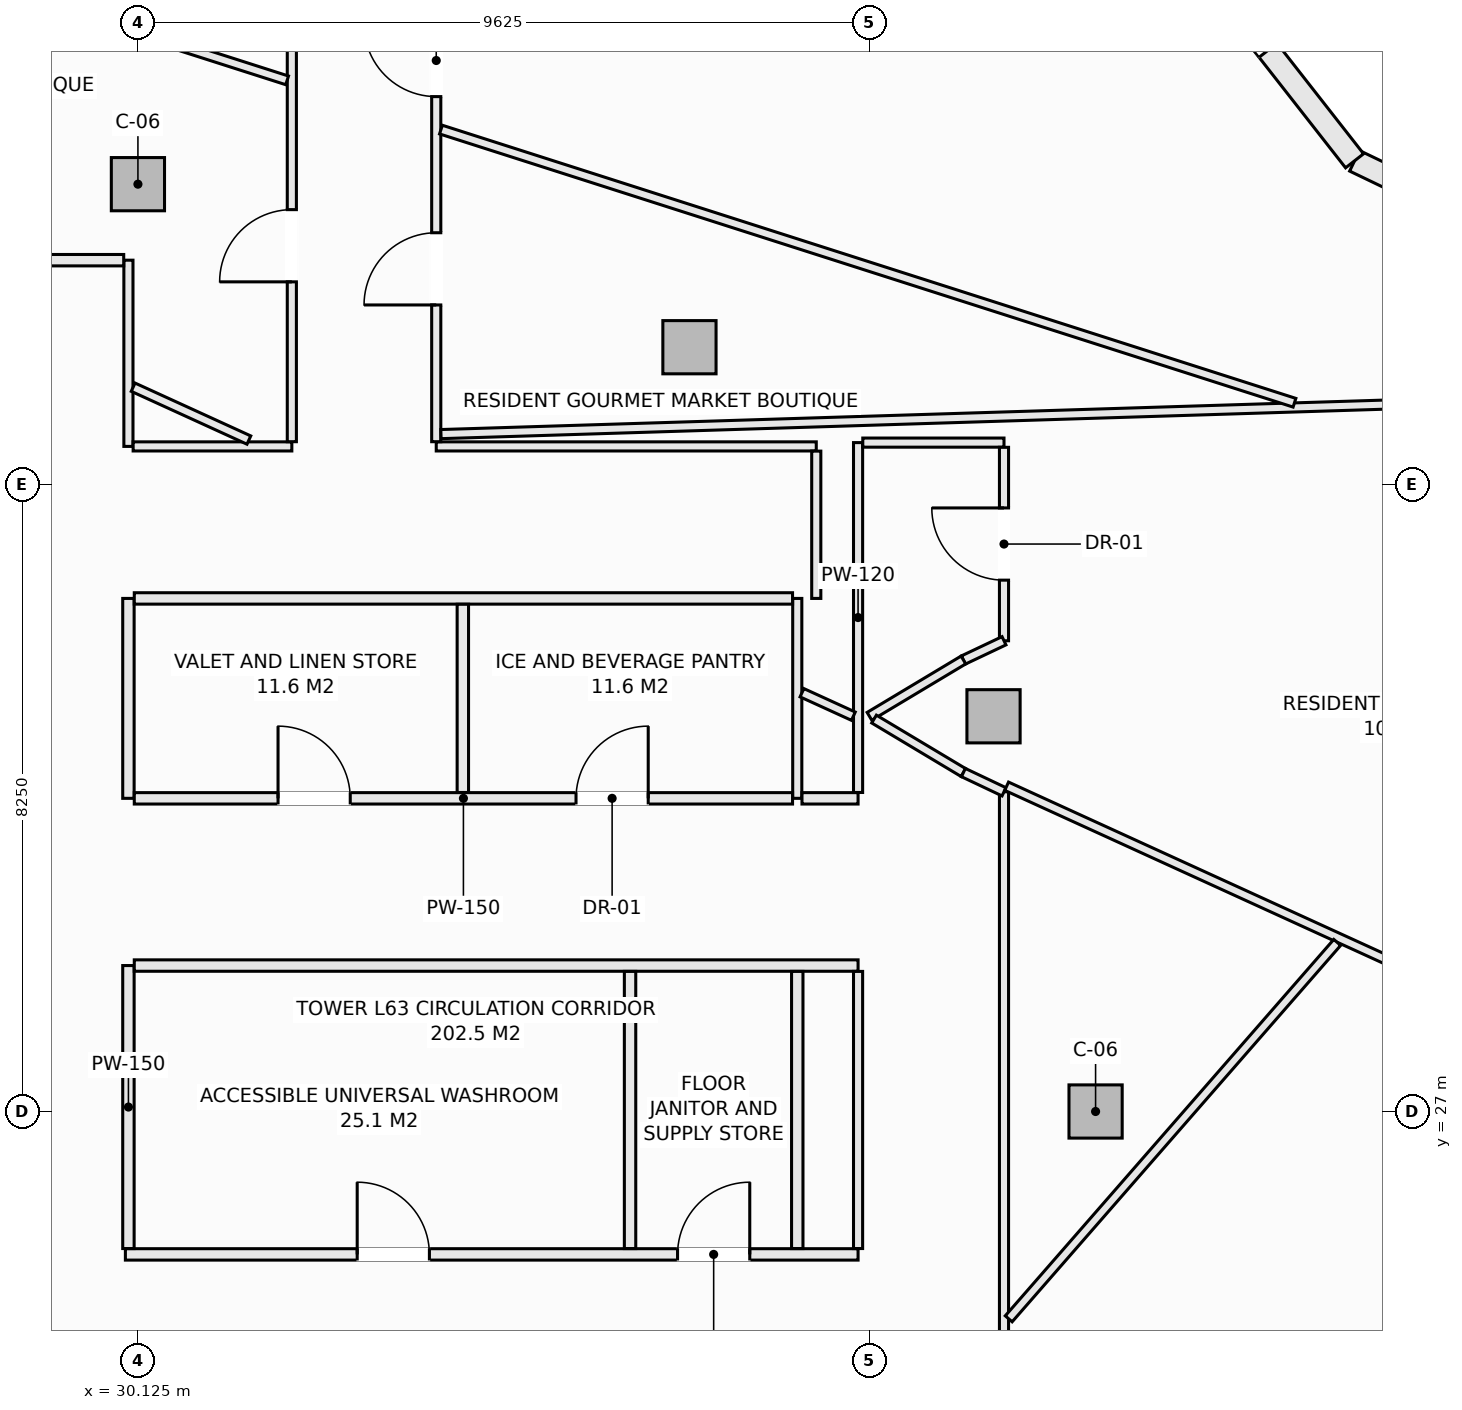
"""IFC4 building model, lengths in metres.
Left out: names, types, materials, properties, quantities, classifications, styles, units other than length and angle.
Written with IfcOpenShell. Run it as: python <this file> out.ifc"""

import sys

from ifc_helpers import new_model, si_unit, direction, frame, frame_2d, origin, origin_2d, place, context, subcontext, project, spatial, rectangle, extrude, element, fill, save


model = new_model("IFC4")
c1 = context("Model", 3, precision=1e-05, world=origin(), true_north=direction((0.0, 1.0)))
c2 = subcontext(c1, "Body", "Model", "MODEL_VIEW")
j1 = project(units=[si_unit("LENGTHUNIT", "METRE"), si_unit("PLANEANGLEUNIT", "RADIAN")], contexts=[c1])
p1 = place(None, origin())
s1 = spatial("IfcSite", under=j1, at=p1, CompositionType="ELEMENT")
p2 = place(p1, origin())
s2 = spatial("IfcBuilding", under=s1, at=p2, CompositionType="ELEMENT")
p3 = place(p2, frame((0.0, 0.0, 236.0)))
s3 = spatial("IfcBuildingStorey", under=s2, at=p3, CompositionType="ELEMENT", Elevation=236.0)
for number, where, z_axis, x_axis in (
    (1, (42.725, 27.0, -0.27), (0.0, 0.0, 1.0), (1.0, 0.0, 0.0)),
    (2, (41.382, 32.199, -0.27), (0.0, 0.0, 1.0), (1.0, 0.0, 0.0)),
    (3, (37.382, 37.055, -0.27), (0.0, 0.0, 1.0), (1.0, 0.0, 0.0)),
    (4, (30.125, 39.2, -0.27), (0.0, 0.0, 1.0), (1.0, 0.0, 0.0)),
):
    element("IfcColumn", number, at=place(p3, frame(where, z_axis=z_axis, x_axis=x_axis)), inside=s3, PredefinedType="COLUMN", context=c2, shape_type="SweptSolid", body=[
        extrude(rectangle(XDim=0.7, YDim=0.7, at=origin_2d()), origin(), (0.0, 0.0, 1.0), 3.3),
    ])
p4 = place(p3, frame((46.133, 39.507, 0.0), z_axis=(0.0, 0.0, 1.0), x_axis=(0.901348331142, -0.433094892545, 0.0)))
e5 = element("IfcWall", 5, at=p4, inside=s3, PredefinedType="SOLIDWALL", context=c2, shape_type="SweptSolid", body=[
    extrude(rectangle(XDim=6.021, YDim=0.3, at=frame_2d((3.01, 0.0))), origin(), (0.0, 0.0, 1.0), 2.605),
])
p5 = place(p4, frame((1.91, 0.0, 0.72)))
e6 = element("IfcOpeningElement", 6, at=p5, cuts=e5, PredefinedType="OPENING", context=c2, shape_type="SweptSolid", body=[
    extrude(rectangle(XDim=2.2, YDim=1.65, at=frame_2d((1.1, 0.825))), frame((0.0, 0.16, 0.0), z_axis=(0.0, -1.0, 0.0), x_axis=(1.0, 0.0, 0.0)), (0.0, 0.0, 1.0), 0.32),
])
p6 = place(p3, frame((42.5, 44.147, 0.0), z_axis=(0.0, 0.0, 1.0), x_axis=(0.616450126935, -0.787393955401, 0.0)))
e7 = element("IfcWall", 7, at=p6, inside=s3, PredefinedType="SOLIDWALL", context=c2, shape_type="SweptSolid", body=[
    extrude(rectangle(XDim=5.893, YDim=0.3, at=frame_2d((2.946, 0.0))), origin(), (0.0, 0.0, 1.0), 2.605),
])
p7 = place(p6, frame((1.846, 0.0, 0.72)))
e8 = element("IfcOpeningElement", 8, at=p7, cuts=e7, PredefinedType="OPENING", context=c2, shape_type="SweptSolid", body=[
    extrude(rectangle(XDim=2.2, YDim=1.65, at=frame_2d((1.1, 0.825))), frame((0.0, 0.16, 0.0), z_axis=(0.0, -1.0, 0.0), x_axis=(1.0, 0.0, 0.0)), (0.0, 0.0, 1.0), 0.32),
])
p8 = place(p3, frame((29.96, 25.12, 0.0), z_axis=(0.0, 0.0, 1.0), x_axis=(1.0, 0.0, 0.0)))
e9 = element("IfcWall", 9, at=p8, inside=s3, PredefinedType="PARTITIONING", context=c2, shape_type="SweptSolid", body=[
    extrude(rectangle(XDim=9.64, YDim=0.15, at=frame_2d((4.82, 0.0))), origin(), (0.0, 0.0, 1.0), 3.03),
])
p9 = place(p8, frame((3.05, 0.0, 0.0)))
e10 = element("IfcOpeningElement", 10, at=p9, cuts=e9, PredefinedType="OPENING", context=c2, shape_type="SweptSolid", body=[
    extrude(rectangle(XDim=0.95, YDim=2.1, at=frame_2d((0.475, 1.05))), frame((0.0, 0.085, 0.0), z_axis=(0.0, -1.0, 0.0), x_axis=(1.0, 0.0, 0.0)), (0.0, 0.0, 1.0), 0.17),
])
p10 = place(p8, frame((7.265, 0.0, 0.0)))
e11 = element("IfcOpeningElement", 11, at=p10, cuts=e9, PredefinedType="OPENING", context=c2, shape_type="SweptSolid", body=[
    extrude(rectangle(XDim=0.95, YDim=2.1, at=frame_2d((0.475, 1.05))), frame((0.0, 0.085, 0.0), z_axis=(0.0, -1.0, 0.0), x_axis=(1.0, 0.0, 0.0)), (0.0, 0.0, 1.0), 0.17),
])
p11 = place(p3, frame((30.0, 25.197, 0.0), z_axis=(0.0, 0.0, 1.0), x_axis=(0.0, 1.0, 0.0)))
e12 = element("IfcWall", 12, at=p11, inside=s3, PredefinedType="PARTITIONING", context=c2, shape_type="SweptSolid", body=[
    extrude(rectangle(XDim=3.723, YDim=0.15, at=frame_2d((1.861, 0.0))), origin(), (0.0, 0.0, 1.0), 3.03),
])
p12 = place(p3, frame((30.0, 31.12, 0.0), z_axis=(0.0, 0.0, 1.0), x_axis=(0.0, 1.0, 0.0)))
e13 = element("IfcWall", 13, at=p12, inside=s3, PredefinedType="PARTITIONING", context=c2, shape_type="SweptSolid", body=[
    extrude(rectangle(XDim=2.63, YDim=0.15, at=frame_2d((1.315, 0.0))), origin(), (0.0, 0.0, 1.0), 3.03),
])
p13 = place(p3, frame((30.0, 35.75, 0.0), z_axis=(0.0, 0.0, 1.0), x_axis=(0.0, 1.0, 0.0)))
e14 = element("IfcWall", 14, at=p13, inside=s3, PredefinedType="PARTITIONING", context=c2, shape_type="SweptSolid", body=[
    extrude(rectangle(XDim=2.45, YDim=0.12, at=frame_2d((1.225, 0.0))), origin(), (0.0, 0.0, 1.0), 3.03),
])
p14 = place(p3, frame((30.077, 28.92, 0.0), z_axis=(0.0, 0.0, 1.0), x_axis=(1.0, 0.0, 0.0)))
e15 = element("IfcWall", 15, at=p14, inside=s3, PredefinedType="PARTITIONING", context=c2, shape_type="SweptSolid", body=[
    extrude(rectangle(XDim=9.523, YDim=0.15, at=frame_2d((4.762, 0.0))), origin(), (0.0, 0.0, 1.0), 3.03),
])
for number, where, z_axis, x_axis in (
    (16, (36.6, 25.197, 0.0), (0.0, 0.0, 1.0), (0.0, 1.0, 0.0)),
    (17, (38.8, 25.197, 0.0), (0.0, 0.0, 1.0), (0.0, 1.0, 0.0)),
):
    element("IfcWall", number, at=place(p3, frame(where, z_axis=z_axis, x_axis=x_axis)), inside=s3, PredefinedType="PARTITIONING", context=c2, shape_type="SweptSolid", body=[
        extrude(rectangle(XDim=3.646, YDim=0.15, at=frame_2d((1.823, 0.0))), origin(), (0.0, 0.0, 1.0), 3.03),
    ])
p15 = place(p3, frame((38.8, 31.12, 0.0), z_axis=(0.0, 0.0, 1.0), x_axis=(0.0, 1.0, 0.0)))
e18 = element("IfcWall", 18, at=p15, inside=s3, PredefinedType="PARTITIONING", context=c2, shape_type="SweptSolid", body=[
    extrude(rectangle(XDim=2.63, YDim=0.12, at=frame_2d((1.315, 0.0))), origin(), (0.0, 0.0, 1.0), 3.03),
])
p16 = place(p3, frame((30.077, 31.12, 0.0), z_axis=(0.0, 0.0, 1.0), x_axis=(1.0, 0.0, 0.0)))
e19 = element("IfcWall", 19, at=p16, inside=s3, PredefinedType="PARTITIONING", context=c2, shape_type="SweptSolid", body=[
    extrude(rectangle(XDim=8.661, YDim=0.15, at=frame_2d((4.331, 0.0))), origin(), (0.0, 0.0, 1.0), 3.03),
])
p17 = place(p16, frame((1.892, 0.0, 0.0)))
e20 = element("IfcOpeningElement", 20, at=p17, cuts=e19, PredefinedType="OPENING", context=c2, shape_type="SweptSolid", body=[
    extrude(rectangle(XDim=0.95, YDim=2.1, at=frame_2d((0.475, 1.05))), frame((0.0, 0.085, 0.0), z_axis=(0.0, -1.0, 0.0), x_axis=(1.0, 0.0, 0.0)), (0.0, 0.0, 1.0), 0.17),
])
p18 = place(p16, frame((5.812, 0.0, 0.0)))
e21 = element("IfcOpeningElement", 21, at=p18, cuts=e19, PredefinedType="OPENING", context=c2, shape_type="SweptSolid", body=[
    extrude(rectangle(XDim=0.95, YDim=2.1, at=frame_2d((0.475, 1.05))), frame((0.0, 0.085, 0.0), z_axis=(0.0, -1.0, 0.0), x_axis=(1.0, 0.0, 0.0)), (0.0, 0.0, 1.0), 0.17),
])
p19 = place(p3, frame((38.862, 31.12, 0.0), z_axis=(0.0, 0.0, 1.0), x_axis=(1.0, 0.0, 0.0)))
e22 = element("IfcWall", 22, at=p19, inside=s3, PredefinedType="PARTITIONING", context=c2, shape_type="SweptSolid", body=[
    extrude(rectangle(XDim=0.738, YDim=0.15, at=frame_2d((0.369, 0.0))), origin(), (0.0, 0.0, 1.0), 3.03),
])
p20 = place(p3, frame((30.077, 33.75, 0.0), z_axis=(0.0, 0.0, 1.0), x_axis=(1.0, 0.0, 0.0)))
e23 = element("IfcWall", 23, at=p20, inside=s3, PredefinedType="PARTITIONING", context=c2, shape_type="SweptSolid", body=[
    extrude(rectangle(XDim=8.661, YDim=0.15, at=frame_2d((4.331, 0.0))), origin(), (0.0, 0.0, 1.0), 3.03),
])
p21 = place(p3, frame((34.4, 31.197, 0.0), z_axis=(0.0, 0.0, 1.0), x_axis=(0.0, 1.0, 0.0)))
e24 = element("IfcWall", 24, at=p21, inside=s3, PredefinedType="PARTITIONING", context=c2, shape_type="SweptSolid", body=[
    extrude(rectangle(XDim=2.476, YDim=0.15, at=frame_2d((1.238, 0.0))), origin(), (0.0, 0.0, 1.0), 3.03),
])
p22 = place(p3, frame((27.227, 38.2, 0.0), z_axis=(0.0, 0.0, 1.0), x_axis=(1.0, 0.0, 0.0)))
e25 = element("IfcWall", 25, at=p22, inside=s3, PredefinedType="PARTITIONING", context=c2, shape_type="SweptSolid", body=[
    extrude(rectangle(XDim=2.711, YDim=0.15, at=frame_2d((1.355, 0.0))), origin(), (0.0, 0.0, 1.0), 3.03),
])
p23 = place(p3, frame((30.062, 35.75, 0.0), z_axis=(0.0, 0.0, 1.0), x_axis=(1.0, 0.0, 0.0)))
e26 = element("IfcWall", 26, at=p23, inside=s3, PredefinedType="PARTITIONING", context=c2, shape_type="SweptSolid", body=[
    extrude(rectangle(XDim=2.088, YDim=0.12, at=frame_2d((1.044, 0.0))), origin(), (0.0, 0.0, 1.0), 3.03),
])
p24 = place(p3, frame((34.05, 35.75, 0.0), z_axis=(0.0, 0.0, 1.0), x_axis=(1.0, 0.0, 0.0)))
e27 = element("IfcWall", 27, at=p24, inside=s3, PredefinedType="PARTITIONING", context=c2, shape_type="SweptSolid", body=[
    extrude(rectangle(XDim=5.0, YDim=0.12, at=frame_2d((2.5, 0.0))), origin(), (0.0, 0.0, 1.0), 2.478),
])
p25 = place(p3, frame((32.15, 35.812, 0.0), z_axis=(0.0, 0.0, 1.0), x_axis=(0.0, 1.0, 0.0)))
e28 = element("IfcWall", 28, at=p25, inside=s3, PredefinedType="PARTITIONING", context=c2, shape_type="SweptSolid", body=[
    extrude(rectangle(XDim=6.388, YDim=0.12, at=frame_2d((3.194, 0.0))), origin(), (0.0, 0.0, 1.0), 3.03),
])
p26 = place(p25, frame((2.103, 0.0, 0.0)))
e29 = element("IfcOpeningElement", 29, at=p26, cuts=e28, PredefinedType="OPENING", context=c2, shape_type="SweptSolid", body=[
    extrude(rectangle(XDim=0.95, YDim=2.1, at=frame_2d((0.475, 1.05))), frame((0.0, 0.07, 0.0), z_axis=(0.0, -1.0, 0.0), x_axis=(1.0, 0.0, 0.0)), (0.0, 0.0, 1.0), 0.14),
])
p27 = place(p3, frame((34.05, 35.812, 0.0), z_axis=(0.0, 0.0, 1.0), x_axis=(0.0, 1.0, 0.0)))
e30 = element("IfcWall", 30, at=p27, inside=s3, PredefinedType="PARTITIONING", context=c2, shape_type="SweptSolid", body=[
    extrude(rectangle(XDim=6.326, YDim=0.12, at=frame_2d((3.163, 0.0))), origin(), (0.0, 0.0, 1.0), 2.77),
])
p28 = place(p27, frame((1.799, 0.0, 0.0)))
e31 = element("IfcOpeningElement", 31, at=p28, cuts=e30, PredefinedType="OPENING", context=c2, shape_type="SweptSolid", body=[
    extrude(rectangle(XDim=0.95, YDim=2.1, at=frame_2d((0.475, 1.05))), frame((0.0, 0.07, 0.0), z_axis=(0.0, -1.0, 0.0), x_axis=(1.0, 0.0, 0.0)), (0.0, 0.0, 1.0), 0.14),
])
p29 = place(p27, frame((4.54, 0.0, 0.0)))
e32 = element("IfcOpeningElement", 32, at=p29, cuts=e30, PredefinedType="OPENING", context=c2, shape_type="SweptSolid", body=[
    extrude(rectangle(XDim=0.95, YDim=2.1, at=frame_2d((0.475, 1.05))), frame((0.0, 0.07, 0.0), z_axis=(0.0, -1.0, 0.0), x_axis=(1.0, 0.0, 0.0)), (0.0, 0.0, 1.0), 0.14),
])
p30 = place(p3, frame((39.05, 33.75, 0.0), z_axis=(0.0, 0.0, 1.0), x_axis=(0.0, 1.0, 0.0)))
e33 = element("IfcWall", 33, at=p30, inside=s3, PredefinedType="PARTITIONING", context=c2, shape_type="SweptSolid", body=[
    extrude(rectangle(XDim=1.938, YDim=0.12, at=frame_2d((0.969, 0.0))), origin(), (0.0, 0.0, 1.0), 3.03),
])
p31 = place(p3, frame((39.6, 25.197, 0.0), z_axis=(0.0, 0.0, 1.0), x_axis=(0.0, 1.0, 0.0)))
e34 = element("IfcWall", 34, at=p31, inside=s3, PredefinedType="PARTITIONING", context=c2, shape_type="SweptSolid", body=[
    extrude(rectangle(XDim=3.646, YDim=0.12, at=frame_2d((1.823, 0.0))), origin(), (0.0, 0.0, 1.0), 3.03),
])
p32 = place(p3, frame((39.6, 31.197, 0.0), z_axis=(0.0, 0.0, 1.0), x_axis=(0.0, 1.0, 0.0)))
e35 = element("IfcWall", 35, at=p32, inside=s3, PredefinedType="PARTITIONING", context=c2, shape_type="SweptSolid", body=[
    extrude(rectangle(XDim=4.603, YDim=0.12, at=frame_2d((2.302, 0.0))), origin(), (0.0, 0.0, 1.0), 3.03),
])
p33 = place(p3, frame((39.662, 35.8, 0.0), z_axis=(0.0, 0.0, 1.0), x_axis=(1.0, 0.0, 0.0)))
e36 = element("IfcWall", 36, at=p33, inside=s3, PredefinedType="PARTITIONING", context=c2, shape_type="SweptSolid", body=[
    extrude(rectangle(XDim=1.858, YDim=0.12, at=frame_2d((0.929, 0.0))), origin(), (0.0, 0.0, 1.0), 2.77),
])
p34 = place(p3, frame((41.52, 22.794, 0.0), z_axis=(0.0, 0.0, 1.0), x_axis=(0.0, 1.0, 0.0)))
e37 = element("IfcWall", 37, at=p34, inside=s3, PredefinedType="PARTITIONING", context=c2, shape_type="SweptSolid", body=[
    extrude(rectangle(XDim=8.412, YDim=0.12, at=frame_2d((4.206, 0.0))), origin(), (0.0, 0.0, 1.0), 2.478),
])
p35 = place(p3, frame((41.52, 33.193, 0.0), z_axis=(0.0, 0.0, 1.0), x_axis=(0.0, 1.0, 0.0)))
e38 = element("IfcWall", 38, at=p35, inside=s3, PredefinedType="PARTITIONING", context=c2, shape_type="SweptSolid", body=[
    extrude(rectangle(XDim=2.545, YDim=0.12, at=frame_2d((1.272, 0.0))), origin(), (0.0, 0.0, 1.0), 3.03),
])
p36 = place(p35, frame((0.798, 0.0, 0.0)))
e39 = element("IfcOpeningElement", 39, at=p36, cuts=e38, PredefinedType="OPENING", context=c2, shape_type="SweptSolid", body=[
    extrude(rectangle(XDim=0.95, YDim=2.1, at=frame_2d((0.475, 1.05))), frame((0.0, 0.07, 0.0), z_axis=(0.0, -1.0, 0.0), x_axis=(1.0, 0.0, 0.0)), (0.0, 0.0, 1.0), 0.14),
])
p37 = place(p3, frame((40.986, 32.94, 0.0), z_axis=(0.0, 0.0, 1.0), x_axis=(0.90356951601, 0.428441512621, 0.0)))
e40 = element("IfcWall", 40, at=p37, inside=s3, PredefinedType="PARTITIONING", context=c2, shape_type="SweptSolid", body=[
    extrude(rectangle(XDim=0.591, YDim=0.12, at=frame_2d((0.295, 0.0))), origin(), (0.0, 0.0, 1.0), 3.03),
])
p38 = place(p3, frame((39.75, 32.199, 0.0), z_axis=(0.0, 0.0, 1.0), x_axis=(0.857702120906, 0.514146935996, 0.0)))
e41 = element("IfcWall", 41, at=p38, inside=s3, PredefinedType="PARTITIONING", context=c2, shape_type="SweptSolid", body=[
    extrude(rectangle(XDim=1.441, YDim=0.12, at=frame_2d((0.721, 0.0))), origin(), (0.0, 0.0, 1.0), 3.03),
])
p39 = place(p3, frame((39.81, 32.163, 0.0), z_axis=(0.0, 0.0, 1.0), x_axis=(0.858011245414, -0.513630901273, 0.0)))
e42 = element("IfcWall", 42, at=p39, inside=s3, PredefinedType="PARTITIONING", context=c2, shape_type="SweptSolid", body=[
    extrude(rectangle(XDim=1.37, YDim=0.12, at=frame_2d((0.685, 0.0))), origin(), (0.0, 0.0, 1.0), 3.03),
])
p40 = place(p3, frame((40.986, 31.459, 0.0), z_axis=(0.0, 0.0, 1.0), x_axis=(0.903729424576, -0.428104107847, 0.0)))
e43 = element("IfcWall", 43, at=p40, inside=s3, PredefinedType="PARTITIONING", context=c2, shape_type="SweptSolid", body=[
    extrude(rectangle(XDim=0.591, YDim=0.12, at=frame_2d((0.295, 0.0))), origin(), (0.0, 0.0, 1.0), 3.03),
])
p41 = place(p3, frame((30.062, 36.529, 0.0), z_axis=(0.0, 0.0, 1.0), x_axis=(0.909595755729, -0.415494357555, 0.0)))
e44 = element("IfcWall", 44, at=p41, inside=s3, PredefinedType="PARTITIONING", context=c2, shape_type="SweptSolid", body=[
    extrude(rectangle(XDim=1.674, YDim=0.12, at=frame_2d((0.837, 0.0))), origin(), (0.0, 0.0, 1.0), 3.03),
])
p42 = place(p3, frame((38.862, 32.51, 0.0), z_axis=(0.0, 0.0, 1.0), x_axis=(0.909577362943, -0.415534620485, 0.0)))
e45 = element("IfcWall", 45, at=p42, inside=s3, PredefinedType="PARTITIONING", context=c2, shape_type="SweptSolid", body=[
    extrude(rectangle(XDim=0.743, YDim=0.12, at=frame_2d((0.372, 0.0))), origin(), (0.0, 0.0, 1.0), 3.03),
])
p43 = place(p3, frame((41.555, 31.279, 0.0), z_axis=(0.0, 0.0, 1.0), x_axis=(0.909606839037, -0.41547009324, 0.0)))
e46 = element("IfcWall", 46, at=p43, inside=s3, PredefinedType="PARTITIONING", context=c2, shape_type="SweptSolid", body=[
    extrude(rectangle(XDim=14.183, YDim=0.12, at=frame_2d((7.091, 0.0))), origin(), (0.0, 0.0, 1.0), 1.823),
])
p44 = place(p3, frame((41.582, 24.272, 0.0), z_axis=(0.0, 0.0, 1.0), x_axis=(0.657567979998, 0.753395216126, 0.0)))
e47 = element("IfcWall", 47, at=p44, inside=s3, PredefinedType="PARTITIONING", context=c2, shape_type="SweptSolid", body=[
    extrude(rectangle(XDim=6.573, YDim=0.12, at=frame_2d((3.287, 0.0))), origin(), (0.0, 0.0, 1.0), 2.478),
])
p45 = place(p3, frame((34.112, 35.912, 0.0), z_axis=(0.0, 0.0, 1.0), x_axis=(0.999512755879, 0.031212991442, 0.0)))
e48 = element("IfcWall", 48, at=p45, inside=s3, PredefinedType="PARTITIONING", context=c2, shape_type="SweptSolid", body=[
    extrude(rectangle(XDim=17.513, YDim=0.12, at=frame_2d((8.756, 0.0))), origin(), (0.0, 0.0, 1.0), 1.823),
])
p46 = place(p3, frame((19.542, 44.581, 0.0), z_axis=(0.0, 0.0, 1.0), x_axis=(0.952423071243, -0.304779089445, 0.0)))
e49 = element("IfcWall", 49, at=p46, inside=s3, PredefinedType="PARTITIONING", context=c2, shape_type="SweptSolid", body=[
    extrude(rectangle(XDim=13.173, YDim=0.12, at=frame_2d((6.586, 0.0))), origin(), (0.0, 0.0, 1.0), 2.605),
])
p47 = place(p3, frame((34.112, 39.918, 0.0), z_axis=(0.0, 0.0, 1.0), x_axis=(0.95242438762, -0.304774975789, 0.0)))
e50 = element("IfcWall", 50, at=p47, inside=s3, PredefinedType="PARTITIONING", context=c2, shape_type="SweptSolid", body=[
    extrude(rectangle(XDim=11.791, YDim=0.12, at=frame_2d((5.896, 0.0))), origin(), (0.0, 0.0, 1.0), 3.03),
])
p48 = place(p9, origin())
e51 = element("IfcDoor", 51, at=p48, inside=s3, OperationType="SINGLE_SWING_LEFT", PredefinedType="DOOR", context=c2, shape_type="SweptSolid", body=[
    extrude(rectangle(XDim=0.95, YDim=2.1, at=frame_2d((0.475, 1.05))), frame((0.0, 0.025, 0.0), z_axis=(0.0, -1.0, 0.0), x_axis=(1.0, 0.0, 0.0)), (0.0, 0.0, 1.0), 0.05),
])
fill(e10, e51)
p49 = place(p10, origin())
e52 = element("IfcDoor", 52, at=p49, inside=s3, OperationType="SINGLE_SWING_RIGHT", PredefinedType="DOOR", context=c2, shape_type="SweptSolid", body=[
    extrude(rectangle(XDim=0.95, YDim=2.1, at=frame_2d((0.475, 1.05))), frame((0.0, 0.025, 0.0), z_axis=(0.0, -1.0, 0.0), x_axis=(1.0, 0.0, 0.0)), (0.0, 0.0, 1.0), 0.05),
])
fill(e11, e52)
p50 = place(p17, origin())
e53 = element("IfcDoor", 53, at=p50, inside=s3, OperationType="SINGLE_SWING_LEFT", PredefinedType="DOOR", context=c2, shape_type="SweptSolid", body=[
    extrude(rectangle(XDim=0.95, YDim=2.1, at=frame_2d((0.475, 1.05))), frame((0.0, 0.025, 0.0), z_axis=(0.0, -1.0, 0.0), x_axis=(1.0, 0.0, 0.0)), (0.0, 0.0, 1.0), 0.05),
])
fill(e20, e53)
p51 = place(p18, origin())
e54 = element("IfcDoor", 54, at=p51, inside=s3, OperationType="SINGLE_SWING_RIGHT", PredefinedType="DOOR", context=c2, shape_type="SweptSolid", body=[
    extrude(rectangle(XDim=0.95, YDim=2.1, at=frame_2d((0.475, 1.05))), frame((0.0, 0.025, 0.0), z_axis=(0.0, -1.0, 0.0), x_axis=(1.0, 0.0, 0.0)), (0.0, 0.0, 1.0), 0.05),
])
fill(e21, e54)
p52 = place(p36, origin())
e55 = element("IfcDoor", 55, at=p52, inside=s3, OperationType="SINGLE_SWING_RIGHT", PredefinedType="DOOR", context=c2, shape_type="SweptSolid", body=[
    extrude(rectangle(XDim=0.95, YDim=2.1, at=frame_2d((0.475, 1.05))), frame((0.0, 0.025, 0.0), z_axis=(0.0, -1.0, 0.0), x_axis=(1.0, 0.0, 0.0)), (0.0, 0.0, 1.0), 0.05),
])
fill(e39, e55)
p53 = place(p28, origin())
e56 = element("IfcDoor", 56, at=p53, inside=s3, OperationType="SINGLE_SWING_LEFT", PredefinedType="DOOR", context=c2, shape_type="SweptSolid", body=[
    extrude(rectangle(XDim=0.95, YDim=2.1, at=frame_2d((0.475, 1.05))), frame((0.0, 0.025, 0.0), z_axis=(0.0, -1.0, 0.0), x_axis=(1.0, 0.0, 0.0)), (0.0, 0.0, 1.0), 0.05),
])
fill(e31, e56)
p54 = place(p29, origin())
e57 = element("IfcDoor", 57, at=p54, inside=s3, OperationType="SINGLE_SWING_RIGHT", PredefinedType="DOOR", context=c2, shape_type="SweptSolid", body=[
    extrude(rectangle(XDim=0.95, YDim=2.1, at=frame_2d((0.475, 1.05))), frame((0.0, 0.025, 0.0), z_axis=(0.0, -1.0, 0.0), x_axis=(1.0, 0.0, 0.0)), (0.0, 0.0, 1.0), 0.05),
])
fill(e32, e57)
p55 = place(p26, origin())
e58 = element("IfcDoor", 58, at=p55, inside=s3, OperationType="SINGLE_SWING_LEFT", PredefinedType="DOOR", context=c2, shape_type="SweptSolid", body=[
    extrude(rectangle(XDim=0.95, YDim=2.1, at=frame_2d((0.475, 1.05))), frame((0.0, 0.025, 0.0), z_axis=(0.0, -1.0, 0.0), x_axis=(1.0, 0.0, 0.0)), (0.0, 0.0, 1.0), 0.05),
])
fill(e29, e58)
save(model, sys.argv[1])
